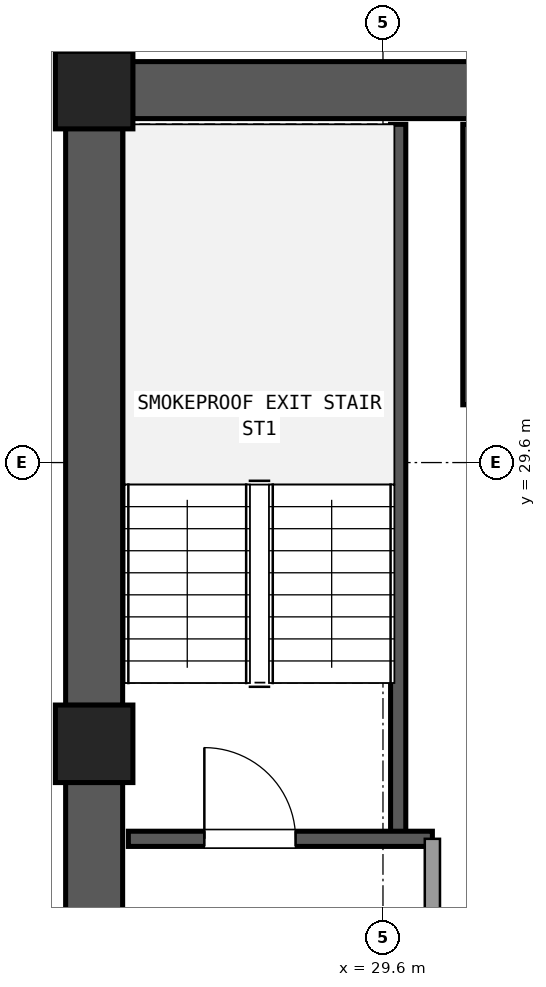
"""IFC4 building model, lengths in metres.
Left out: names, types, materials, properties, quantities, classifications, styles, units other than length and angle.
Written with IfcOpenShell. Run it as: python <this file> out.ifc"""

import sys

from ifc_helpers import new_model, si_unit, direction, frame, frame_2d, origin, origin_2d, place, context, subcontext, project, spatial, rectangle, extrude, element, fill, save


model = new_model("IFC4")
c1 = context("Model", 3, precision=1e-05, world=origin(), true_north=direction((0.0, 1.0)))
c2 = subcontext(c1, "Body", "Model", "MODEL_VIEW")
j1 = project(units=[si_unit("LENGTHUNIT", "METRE"), si_unit("PLANEANGLEUNIT", "RADIAN")], contexts=[c1])
p1 = place(None, origin())
s1 = spatial("IfcSite", under=j1, at=p1, CompositionType="ELEMENT")
p2 = place(p1, origin())
s2 = spatial("IfcBuilding", under=s1, at=p2, CompositionType="ELEMENT")
p3 = place(p2, frame((0.0, 0.0, 106.38)))
s3 = spatial("IfcBuildingStorey", under=s2, at=p3, CompositionType="ELEMENT", Elevation=106.38)
for number, where, z_axis, x_axis in (
    (1, (25.8, 34.5, 0.0), (0.0, 0.0, 1.0), (1.0, 0.0, 0.0)),
    (2, (25.8, 25.9, 0.0), (0.0, 0.0, 1.0), (1.0, 0.0, 0.0)),
):
    element("IfcColumn", number, at=place(p3, frame(where, z_axis=z_axis, x_axis=x_axis)), inside=s3, PredefinedType="COLUMN", context=c2, shape_type="SweptSolid", body=[
        extrude(rectangle(XDim=1.02, YDim=1.02, at=origin_2d()), origin(), (0.0, 0.0, 1.0), 3.6),
    ])
p4 = place(p3, frame((36.495, 34.5, 0.0), z_axis=(0.0, 0.0, 1.0), x_axis=(-1.0, 0.0, 0.0)))
e3 = element("IfcWall", 3, at=p4, inside=s3, PredefinedType="SHEAR", context=c2, shape_type="SweptSolid", body=[
    extrude(rectangle(XDim=10.19, YDim=0.75, at=frame_2d((5.095, 0.0))), origin(), (0.0, 0.0, 1.0), 3.32),
])
p5 = place(p4, frame((4.095, 0.0, 0.0)))
e4 = element("IfcOpeningElement", 4, at=p5, cuts=e3, PredefinedType="OPENING", context=c2, shape_type="SweptSolid", body=[
    extrude(rectangle(XDim=1.2, YDim=2.15, at=frame_2d((0.6, 1.075))), frame((0.0, 0.385, 0.0), z_axis=(0.0, -1.0, 0.0), x_axis=(1.0, 0.0, 0.0)), (0.0, 0.0, 1.0), 0.77),
])
p6 = place(p3, frame((25.8, 33.995, 0.0), z_axis=(0.0, 0.0, 1.0), x_axis=(0.0, -1.0, 0.0)))
e5 = element("IfcWall", 5, at=p6, inside=s3, PredefinedType="SHEAR", context=c2, shape_type="SweptSolid", body=[
    extrude(rectangle(XDim=7.59, YDim=0.75, at=frame_2d((3.795, 0.0))), origin(), (0.0, 0.0, 1.0), 3.32),
])
p7 = place(p3, frame((25.8, 25.395, 0.0), z_axis=(0.0, 0.0, 1.0), x_axis=(0.0, -1.0, 0.0)))
e6 = element("IfcWall", 6, at=p7, inside=s3, PredefinedType="SHEAR", context=c2, shape_type="SweptSolid", body=[
    extrude(rectangle(XDim=7.59, YDim=0.75, at=frame_2d((3.795, 0.0))), origin(), (0.0, 0.0, 1.0), 3.32),
])
p8 = place(p7, frame((2.145, 0.0, 0.0)))
e7 = element("IfcOpeningElement", 7, at=p8, cuts=e6, PredefinedType="OPENING", context=c2, shape_type="SweptSolid", body=[
    extrude(rectangle(XDim=1.2, YDim=2.15, at=frame_2d((0.6, 1.075))), frame((0.0, 0.385, 0.0), z_axis=(0.0, -1.0, 0.0), x_axis=(1.0, 0.0, 0.0)), (0.0, 0.0, 1.0), 0.77),
])
p9 = place(p3, frame((29.8, 24.65, 0.0), z_axis=(0.0, 0.0, 1.0), x_axis=(0.0, 1.0, 0.0)))
e8 = element("IfcWall", 8, at=p9, inside=s3, PredefinedType="SHEAR", context=c2, shape_type="SweptSolid", body=[
    extrude(rectangle(XDim=9.4, YDim=0.2, at=frame_2d((4.7, 0.0))), origin(), (0.0, 0.0, 1.0), 3.32),
])
p10 = place(p3, frame((26.25, 24.65, 0.0), z_axis=(0.0, 0.0, 1.0), x_axis=(1.0, 0.0, 0.0)))
e9 = element("IfcWall", 9, at=p10, inside=s3, PredefinedType="SHEAR", context=c2, shape_type="SweptSolid", body=[
    extrude(rectangle(XDim=4.0, YDim=0.2, at=frame_2d((2.0, 0.0))), origin(), (0.0, 0.0, 1.0), 3.32),
])
p11 = place(p10, frame((1.0, 0.0, 0.0)))
e10 = element("IfcOpeningElement", 10, at=p11, cuts=e9, PredefinedType="OPENING", context=c2, shape_type="SweptSolid", body=[
    extrude(rectangle(XDim=1.2, YDim=2.15, at=frame_2d((0.6, 1.075))), frame((0.0, 0.11, 0.0), z_axis=(0.0, -1.0, 0.0), x_axis=(1.0, 0.0, 0.0)), (0.0, 0.0, 1.0), 0.22),
])
p12 = place(p3, frame((30.75, 30.36, 0.0), z_axis=(0.0, 0.0, 1.0), x_axis=(0.0, 1.0, 0.0)))
e11 = element("IfcWall", 11, at=p12, inside=s3, PredefinedType="SHEAR", context=c2, shape_type="SweptSolid", body=[
    extrude(rectangle(XDim=3.69, YDim=0.2, at=frame_2d((1.845, 0.0))), origin(), (0.0, 0.0, 1.0), 3.32),
])
p13 = place(p3, frame((30.25, 17.75, 0.0), z_axis=(0.0, 0.0, 1.0), x_axis=(0.0, 1.0, 0.0)))
e12 = element("IfcWall", 12, at=p13, inside=s3, PredefinedType="SOLIDWALL", context=c2, shape_type="SweptSolid", body=[
    extrude(rectangle(XDim=6.9, YDim=0.2, at=frame_2d((3.45, 0.0))), origin(), (0.0, 0.0, 1.0), 2.61),
])
p14 = place(p13, frame((4.15, 0.0, 0.0)))
e13 = element("IfcOpeningElement", 13, at=p14, cuts=e12, PredefinedType="OPENING", context=c2, shape_type="SweptSolid", body=[
    extrude(rectangle(XDim=1.2, YDim=2.15, at=frame_2d((0.6, 1.075))), frame((0.0, 0.11, 0.0), z_axis=(0.0, -1.0, 0.0), x_axis=(1.0, 0.0, 0.0)), (0.0, 0.0, 1.0), 0.22),
])
p15 = place(p11, origin())
e14 = element("IfcDoor", 14, at=p15, inside=s3, OperationType="SINGLE_SWING_LEFT", PredefinedType="DOOR", context=c2, shape_type="SweptSolid", body=[
    extrude(rectangle(XDim=1.2, YDim=2.15, at=frame_2d((0.6, 1.075))), frame((0.0, 0.025, 0.0), z_axis=(0.0, -1.0, 0.0), x_axis=(1.0, 0.0, 0.0)), (0.0, 0.0, 1.0), 0.05),
])
fill(e10, e14)
save(model, sys.argv[1])
